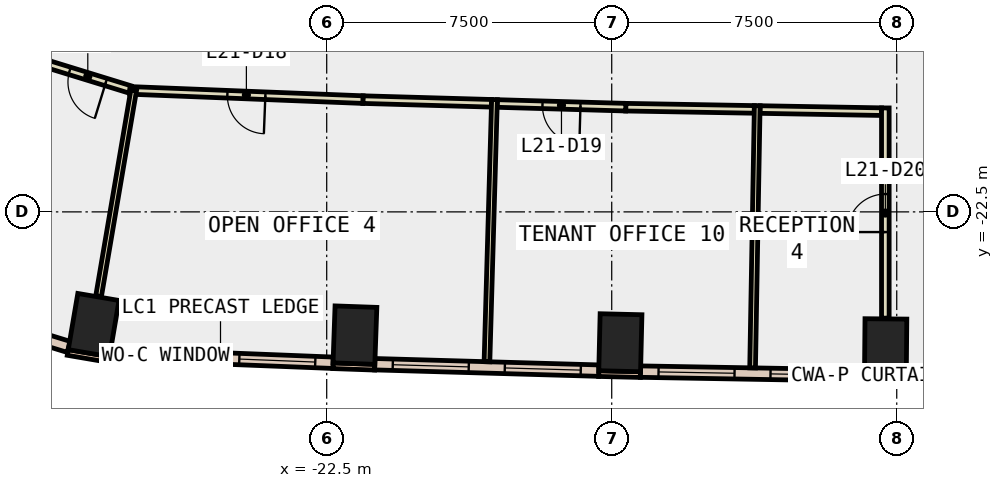
"""IFC4 building model, lengths in metres.
Left out: names, types, materials, properties, quantities, classifications, styles, units other than length and angle.
Written with IfcOpenShell. Run it as: python <this file> out.ifc"""

import sys

from ifc_helpers import new_model, si_unit, direction, frame, frame_2d, origin, origin_2d, place, context, subcontext, project, spatial, rectangle, extrude, element, fill, save


model = new_model("IFC4")
c1 = context("Model", 3, precision=1e-05, world=origin(), true_north=direction((0.0, 1.0)))
c2 = subcontext(c1, "Body", "Model", "MODEL_VIEW")
j1 = project(units=[si_unit("LENGTHUNIT", "METRE"), si_unit("PLANEANGLEUNIT", "RADIAN")], contexts=[c1])
p1 = place(None, origin())
s1 = spatial("IfcSite", under=j1, at=p1, CompositionType="ELEMENT")
p2 = place(p1, origin())
s2 = spatial("IfcBuilding", under=s1, at=p2, CompositionType="ELEMENT")
p3 = place(p2, frame((0.0, 0.0, 99.2)))
s3 = spatial("IfcBuildingStorey", under=s2, at=p3, CompositionType="ELEMENT", Elevation=99.2)
for number, where, z_axis, x_axis in (
    (1, (-28.633, -25.478, -0.4), (0.0, 0.0, 1.0), (-0.986, 0.168, 0.0)),
    (2, (-21.757, -25.743, -0.4), (0.0, 0.0, 1.0), (-0.999, 0.035, 0.0)),
    (3, (-14.773, -25.943, -0.4), (0.0, 0.0, 1.0), (-1.0, 0.024, 0.0)),
    (4, (-7.792, -26.066, -0.4), (0.0, 0.0, 1.0), (-1.0, 0.009, 0.0)),
):
    element("IfcColumn", number, at=place(p3, frame(where, z_axis=z_axis, x_axis=x_axis)), inside=s3, PredefinedType="COLUMN", context=c2, shape_type="SweptSolid", body=[
        extrude(rectangle(XDim=1.1, YDim=1.5, at=origin_2d()), origin(), (0.0, 0.0, 1.0), 4.2),
    ])
p4 = place(p3, frame((-29.314, -26.199, 0.0), z_axis=(0.0, 0.0, 1.0), x_axis=(0.985763338892, -0.168138751323, 0.0)))
e5 = element("IfcWall", 5, at=p4, inside=s3, PredefinedType="STANDARD", context=c2, shape_type="SweptSolid", body=[
    extrude(rectangle(XDim=1.101, YDim=0.15, at=frame_2d((0.55, 0.0))), origin(), (0.0, 0.0, 1.0), 3.8),
])
p5 = place(p3, frame((-22.336, -26.548, 0.0), z_axis=(0.0, 0.0, 1.0), x_axis=(0.999376638472, -0.035303462679, 0.0)))
e6 = element("IfcWall", 6, at=p5, inside=s3, PredefinedType="STANDARD", context=c2, shape_type="SweptSolid", body=[
    extrude(rectangle(XDim=1.1, YDim=0.15, at=frame_2d((0.55, 0.0))), origin(), (0.0, 0.0, 1.0), 3.8),
])
p6 = place(p3, frame((-15.343, -26.755, 0.0), z_axis=(0.0, 0.0, 1.0), x_axis=(0.999718180159, -0.023739424163, 0.0)))
e7 = element("IfcWall", 7, at=p6, inside=s3, PredefinedType="STANDARD", context=c2, shape_type="SweptSolid", body=[
    extrude(rectangle(XDim=1.1, YDim=0.15, at=frame_2d((0.55, 0.0))), origin(), (0.0, 0.0, 1.0), 3.8),
])
p7 = place(p3, frame((-8.349, -26.886, 0.0), z_axis=(0.0, 0.0, 1.0), x_axis=(0.99995860686, -0.009098602504, 0.0)))
e8 = element("IfcWall", 8, at=p7, inside=s3, PredefinedType="STANDARD", context=c2, shape_type="SweptSolid", body=[
    extrude(rectangle(XDim=1.1, YDim=0.15, at=frame_2d((0.55, 0.0))), origin(), (0.0, 0.0, 1.0), 3.8),
])
p8 = place(p3, frame((-28.205, -26.238, 0.0), z_axis=(0.0, 0.0, 1.0), x_axis=(0.99922113396, -0.039460428885, 0.0)))
e9 = element("IfcWall", 9, at=p8, inside=s3, PredefinedType="STANDARD", context=c2, shape_type="SweptSolid", body=[
    extrude(rectangle(XDim=5.878, YDim=0.3, at=frame_2d((2.939, 0.0))), origin(), (0.0, 0.0, 1.0), 3.8),
])
p9 = place(p8, frame((0.469, 0.0, 0.9)))
e10 = element("IfcOpeningElement", 10, at=p9, cuts=e9, PredefinedType="OPENING", context=c2, shape_type="SweptSolid", body=[
    extrude(rectangle(XDim=2.0, YDim=2.6, at=frame_2d((1.0, 1.3))), frame((0.0, 0.16, 0.0), z_axis=(0.0, -1.0, 0.0), x_axis=(1.0, 0.0, 0.0)), (0.0, 0.0, 1.0), 0.32),
])
p10 = place(p8, frame((3.408, 0.0, 0.9)))
e11 = element("IfcOpeningElement", 11, at=p10, cuts=e9, PredefinedType="OPENING", context=c2, shape_type="SweptSolid", body=[
    extrude(rectangle(XDim=2.0, YDim=2.6, at=frame_2d((1.0, 1.3))), frame((0.0, 0.16, 0.0), z_axis=(0.0, -1.0, 0.0), x_axis=(1.0, 0.0, 0.0)), (0.0, 0.0, 1.0), 0.32),
])
p11 = place(p3, frame((-21.235, -26.508, 0.0), z_axis=(0.0, 0.0, 1.0), x_axis=(0.999589583914, -0.028647229026, 0.0)))
e12 = element("IfcWall", 12, at=p11, inside=s3, PredefinedType="STANDARD", context=c2, shape_type="SweptSolid", body=[
    extrude(rectangle(XDim=5.897, YDim=0.3, at=frame_2d((2.949, 0.0))), origin(), (0.0, 0.0, 1.0), 3.8),
])
p12 = place(p11, frame((0.474, 0.0, 0.9)))
e13 = element("IfcOpeningElement", 13, at=p12, cuts=e12, PredefinedType="OPENING", context=c2, shape_type="SweptSolid", body=[
    extrude(rectangle(XDim=2.0, YDim=2.6, at=frame_2d((1.0, 1.3))), frame((0.0, 0.16, 0.0), z_axis=(0.0, -1.0, 0.0), x_axis=(1.0, 0.0, 0.0)), (0.0, 0.0, 1.0), 0.32),
])
p13 = place(p11, frame((3.423, 0.0, 0.9)))
e14 = element("IfcOpeningElement", 14, at=p13, cuts=e12, PredefinedType="OPENING", context=c2, shape_type="SweptSolid", body=[
    extrude(rectangle(XDim=2.0, YDim=2.6, at=frame_2d((1.0, 1.3))), frame((0.0, 0.16, 0.0), z_axis=(0.0, -1.0, 0.0), x_axis=(1.0, 0.0, 0.0)), (0.0, 0.0, 1.0), 0.32),
])
p14 = place(p3, frame((-14.242, -26.703, 0.0), z_axis=(0.0, 0.0, 1.0), x_axis=(0.999847261365, -0.017477240672, 0.0)))
e15 = element("IfcWall", 15, at=p14, inside=s3, PredefinedType="STANDARD", context=c2, shape_type="SweptSolid", body=[
    extrude(rectangle(XDim=5.895, YDim=0.3, at=frame_2d((2.948, 0.0))), origin(), (0.0, 0.0, 1.0), 3.8),
])
p15 = place(p14, frame((0.474, 0.0, 0.9)))
e16 = element("IfcOpeningElement", 16, at=p15, cuts=e15, PredefinedType="OPENING", context=c2, shape_type="SweptSolid", body=[
    extrude(rectangle(XDim=2.0, YDim=2.6, at=frame_2d((1.0, 1.3))), frame((0.0, 0.16, 0.0), z_axis=(0.0, -1.0, 0.0), x_axis=(1.0, 0.0, 0.0)), (0.0, 0.0, 1.0), 0.32),
])
p16 = place(p14, frame((3.421, 0.0, 0.9)))
e17 = element("IfcOpeningElement", 17, at=p16, cuts=e15, PredefinedType="OPENING", context=c2, shape_type="SweptSolid", body=[
    extrude(rectangle(XDim=2.0, YDim=2.6, at=frame_2d((1.0, 1.3))), frame((0.0, 0.16, 0.0), z_axis=(0.0, -1.0, 0.0), x_axis=(1.0, 0.0, 0.0)), (0.0, 0.0, 1.0), 0.32),
])
p17 = place(p3, frame((-32.924, -24.935, 0.0), z_axis=(0.0, 0.0, 1.0), x_axis=(0.955841433148, -0.293882892794, 0.0)))
e18 = element("IfcWall", 18, at=p17, inside=s3, PredefinedType="STANDARD", context=c2, shape_type="SweptSolid", body=[
    extrude(rectangle(XDim=3.804, YDim=0.3, at=frame_2d((1.902, 0.0))), origin(), (0.0, 0.0, 1.0), 3.8),
])
p18 = place(p17, frame((1.202, 0.0, 0.9)))
e19 = element("IfcOpeningElement", 19, at=p18, cuts=e18, PredefinedType="OPENING", context=c2, shape_type="SweptSolid", body=[
    extrude(rectangle(XDim=1.4, YDim=2.6, at=frame_2d((0.7, 1.3))), frame((0.0, 0.16, 0.0), z_axis=(0.0, -1.0, 0.0), x_axis=(1.0, 0.0, 0.0)), (0.0, 0.0, 1.0), 0.32),
])
p19 = place(p3, frame((-27.676, -19.278, 0.0), z_axis=(0.0, 0.0, 1.0), x_axis=(-0.95581080774, 0.293982482143, 0.0)))
e20 = element("IfcWall", 20, at=p19, inside=s3, PredefinedType="PARTITIONING", context=c2, shape_type="SweptSolid", body=[
    extrude(rectangle(XDim=2.324, YDim=0.2, at=frame_2d((1.162, 0.0))), origin(), (0.0, 0.0, 1.0), 3.8),
])
p20 = place(p19, frame((0.662, 0.0, 0.0)))
e21 = element("IfcOpeningElement", 21, at=p20, cuts=e20, PredefinedType="OPENING", context=c2, shape_type="SweptSolid", body=[
    extrude(rectangle(XDim=1.0, YDim=2.1, at=frame_2d((0.5, 1.05))), frame((0.0, 0.11, 0.0), z_axis=(0.0, -1.0, 0.0), x_axis=(1.0, 0.0, 0.0)), (0.0, 0.0, 1.0), 0.22),
])
p21 = place(p3, frame((-18.163, -19.643, 0.0), z_axis=(0.0, 0.0, 1.0), x_axis=(-0.999588017684, 0.028701827504, 0.0)))
e22 = element("IfcWall", 22, at=p21, inside=s3, PredefinedType="PARTITIONING", context=c2, shape_type="SweptSolid", body=[
    extrude(rectangle(XDim=3.385, YDim=0.2, at=frame_2d((1.693, 0.0))), origin(), (0.0, 0.0, 1.0), 3.8),
])
p22 = place(p3, frame((-21.547, -19.546, 0.0), z_axis=(0.0, 0.0, 1.0), x_axis=(-0.999216450883, 0.039578836331, 0.0)))
e23 = element("IfcWall", 23, at=p22, inside=s3, PredefinedType="PARTITIONING", context=c2, shape_type="SweptSolid", body=[
    extrude(rectangle(XDim=6.138, YDim=0.2, at=frame_2d((3.069, 0.0))), origin(), (0.0, 0.0, 1.0), 3.8),
])
p23 = place(p22, frame((2.569, 0.0, 0.0)))
e24 = element("IfcOpeningElement", 24, at=p23, cuts=e23, PredefinedType="OPENING", context=c2, shape_type="SweptSolid", body=[
    extrude(rectangle(XDim=1.0, YDim=2.1, at=frame_2d((0.5, 1.05))), frame((0.0, 0.11, 0.0), z_axis=(0.0, -1.0, 0.0), x_axis=(1.0, 0.0, 0.0)), (0.0, 0.0, 1.0), 0.22),
])
p24 = place(p3, frame((-11.248, -19.804, 0.0), z_axis=(0.0, 0.0, 1.0), x_axis=(-0.999848794654, 0.017389302123, 0.0)))
e25 = element("IfcWall", 25, at=p24, inside=s3, PredefinedType="PARTITIONING", context=c2, shape_type="SweptSolid", body=[
    extrude(rectangle(XDim=3.384, YDim=0.2, at=frame_2d((1.692, 0.0))), origin(), (0.0, 0.0, 1.0), 3.8),
])
p25 = place(p3, frame((-14.631, -19.745, 0.0), z_axis=(0.0, 0.0, 1.0), x_axis=(-0.999587482491, 0.028720460441, 0.0)))
e26 = element("IfcWall", 26, at=p25, inside=s3, PredefinedType="PARTITIONING", context=c2, shape_type="SweptSolid", body=[
    extrude(rectangle(XDim=3.383, YDim=0.2, at=frame_2d((1.692, 0.0))), origin(), (0.0, 0.0, 1.0), 3.8),
])
p26 = place(p25, frame((1.192, 0.0, 0.0)))
e27 = element("IfcOpeningElement", 27, at=p26, cuts=e26, PredefinedType="OPENING", context=c2, shape_type="SweptSolid", body=[
    extrude(rectangle(XDim=1.0, YDim=2.1, at=frame_2d((0.5, 1.05))), frame((0.0, 0.11, 0.0), z_axis=(0.0, -1.0, 0.0), x_axis=(1.0, 0.0, 0.0)), (0.0, 0.0, 1.0), 0.22),
])
p27 = place(p3, frame((-7.9, -19.863, 0.0), z_axis=(0.0, 0.0, 1.0), x_axis=(-0.999845883554, 0.017555886191, 0.0)))
e28 = element("IfcWall", 28, at=p27, inside=s3, PredefinedType="PARTITIONING", context=c2, shape_type="SweptSolid", body=[
    extrude(rectangle(XDim=3.198, YDim=0.2, at=frame_2d((1.599, 0.0))), origin(), (0.0, 0.0, 1.0), 3.8),
])
p28 = place(p3, frame((-7.8, -25.296, 0.0), z_axis=(0.0, 0.0, 1.0), x_axis=(0.0, 1.0, 0.0)))
e29 = element("IfcWall", 29, at=p28, inside=s3, PredefinedType="PARTITIONING", context=c2, shape_type="SweptSolid", body=[
    extrude(rectangle(XDim=5.531, YDim=0.2, at=frame_2d((2.766, 0.0))), origin(), (0.0, 0.0, 1.0), 3.8),
])
p29 = place(p28, frame((2.265, 0.0, 0.0)))
e30 = element("IfcOpeningElement", 30, at=p29, cuts=e29, PredefinedType="OPENING", context=c2, shape_type="SweptSolid", body=[
    extrude(rectangle(XDim=1.0, YDim=2.1, at=frame_2d((0.5, 1.05))), frame((0.0, 0.11, 0.0), z_axis=(0.0, -1.0, 0.0), x_axis=(1.0, 0.0, 0.0)), (0.0, 0.0, 1.0), 0.22),
])
p30 = place(p3, frame((-27.58, -19.307, 0.0), z_axis=(0.0, 0.0, 1.0), x_axis=(-0.168089900424, -0.98577167, 0.0)))
e31 = element("IfcWall", 31, at=p30, inside=s3, PredefinedType="PARTITIONING", context=c2, shape_type="SweptSolid", body=[
    extrude(rectangle(XDim=5.49, YDim=0.15, at=frame_2d((2.745, 0.0))), origin(), (0.0, 0.0, 1.0), 3.8),
])
p31 = place(p3, frame((-18.085, -19.545, 0.0), z_axis=(0.0, 0.0, 1.0), x_axis=(-0.02869106823, -0.999588326564, 0.0)))
e32 = element("IfcWall", 32, at=p31, inside=s3, PredefinedType="PARTITIONING", context=c2, shape_type="SweptSolid", body=[
    extrude(rectangle(XDim=6.901, YDim=0.15, at=frame_2d((3.451, 0.0))), origin(), (0.0, 0.0, 1.0), 3.8),
])
p32 = place(p3, frame((-11.171, -19.706, 0.0), z_axis=(0.0, 0.0, 1.0), x_axis=(-0.017691335128, -0.999843496084, 0.0)))
e33 = element("IfcWall", 33, at=p32, inside=s3, PredefinedType="PARTITIONING", context=c2, shape_type="SweptSolid", body=[
    extrude(rectangle(XDim=6.9, YDim=0.15, at=frame_2d((3.45, 0.0))), origin(), (0.0, 0.0, 1.0), 3.8),
])
p33 = place(p9, origin())
e34 = element("IfcWindow", 34, at=p33, inside=s3, PartitioningType="SINGLE_PANEL", PredefinedType="WINDOW", context=c2, shape_type="SweptSolid", body=[
    extrude(rectangle(XDim=2.0, YDim=2.6, at=frame_2d((1.0, 1.3))), frame((0.0, 0.03, 0.0), z_axis=(0.0, -1.0, 0.0), x_axis=(1.0, 0.0, 0.0)), (0.0, 0.0, 1.0), 0.06),
])
fill(e10, e34)
p34 = place(p10, origin())
e35 = element("IfcWindow", 35, at=p34, inside=s3, PartitioningType="SINGLE_PANEL", PredefinedType="WINDOW", context=c2, shape_type="SweptSolid", body=[
    extrude(rectangle(XDim=2.0, YDim=2.6, at=frame_2d((1.0, 1.3))), frame((0.0, 0.03, 0.0), z_axis=(0.0, -1.0, 0.0), x_axis=(1.0, 0.0, 0.0)), (0.0, 0.0, 1.0), 0.06),
])
fill(e11, e35)
p35 = place(p12, origin())
e36 = element("IfcWindow", 36, at=p35, inside=s3, PartitioningType="SINGLE_PANEL", PredefinedType="WINDOW", context=c2, shape_type="SweptSolid", body=[
    extrude(rectangle(XDim=2.0, YDim=2.6, at=frame_2d((1.0, 1.3))), frame((0.0, 0.03, 0.0), z_axis=(0.0, -1.0, 0.0), x_axis=(1.0, 0.0, 0.0)), (0.0, 0.0, 1.0), 0.06),
])
fill(e13, e36)
p36 = place(p13, origin())
e37 = element("IfcWindow", 37, at=p36, inside=s3, PartitioningType="SINGLE_PANEL", PredefinedType="WINDOW", context=c2, shape_type="SweptSolid", body=[
    extrude(rectangle(XDim=2.0, YDim=2.6, at=frame_2d((1.0, 1.3))), frame((0.0, 0.03, 0.0), z_axis=(0.0, -1.0, 0.0), x_axis=(1.0, 0.0, 0.0)), (0.0, 0.0, 1.0), 0.06),
])
fill(e14, e37)
p37 = place(p15, origin())
e38 = element("IfcWindow", 38, at=p37, inside=s3, PartitioningType="SINGLE_PANEL", PredefinedType="WINDOW", context=c2, shape_type="SweptSolid", body=[
    extrude(rectangle(XDim=2.0, YDim=2.6, at=frame_2d((1.0, 1.3))), frame((0.0, 0.03, 0.0), z_axis=(0.0, -1.0, 0.0), x_axis=(1.0, 0.0, 0.0)), (0.0, 0.0, 1.0), 0.06),
])
fill(e16, e38)
p38 = place(p16, origin())
e39 = element("IfcWindow", 39, at=p38, inside=s3, PartitioningType="SINGLE_PANEL", PredefinedType="WINDOW", context=c2, shape_type="SweptSolid", body=[
    extrude(rectangle(XDim=2.0, YDim=2.6, at=frame_2d((1.0, 1.3))), frame((0.0, 0.03, 0.0), z_axis=(0.0, -1.0, 0.0), x_axis=(1.0, 0.0, 0.0)), (0.0, 0.0, 1.0), 0.06),
])
fill(e17, e39)
p39 = place(p20, origin())
e40 = element("IfcDoor", 40, at=p39, inside=s3, OperationType="SINGLE_SWING_LEFT", PredefinedType="DOOR", context=c2, shape_type="SweptSolid", body=[
    extrude(rectangle(XDim=1.0, YDim=2.1, at=frame_2d((0.5, 1.05))), frame((0.0, 0.025, 0.0), z_axis=(0.0, -1.0, 0.0), x_axis=(1.0, 0.0, 0.0)), (0.0, 0.0, 1.0), 0.05),
])
fill(e21, e40)
p40 = place(p23, origin())
e41 = element("IfcDoor", 41, at=p40, inside=s3, OperationType="SINGLE_SWING_LEFT", PredefinedType="DOOR", context=c2, shape_type="SweptSolid", body=[
    extrude(rectangle(XDim=1.0, YDim=2.1, at=frame_2d((0.5, 1.05))), frame((0.0, 0.025, 0.0), z_axis=(0.0, -1.0, 0.0), x_axis=(1.0, 0.0, 0.0)), (0.0, 0.0, 1.0), 0.05),
])
fill(e24, e41)
p41 = place(p26, origin())
e42 = element("IfcDoor", 42, at=p41, inside=s3, OperationType="SINGLE_SWING_RIGHT", PredefinedType="DOOR", context=c2, shape_type="SweptSolid", body=[
    extrude(rectangle(XDim=1.0, YDim=2.1, at=frame_2d((0.5, 1.05))), frame((0.0, 0.025, 0.0), z_axis=(0.0, -1.0, 0.0), x_axis=(1.0, 0.0, 0.0)), (0.0, 0.0, 1.0), 0.05),
])
fill(e27, e42)
p42 = place(p29, origin())
e43 = element("IfcDoor", 43, at=p42, inside=s3, OperationType="SINGLE_SWING_LEFT", PredefinedType="DOOR", context=c2, shape_type="SweptSolid", body=[
    extrude(rectangle(XDim=1.0, YDim=2.1, at=frame_2d((0.5, 1.05))), frame((0.0, 0.025, 0.0), z_axis=(0.0, -1.0, 0.0), x_axis=(1.0, 0.0, 0.0)), (0.0, 0.0, 1.0), 0.05),
])
fill(e30, e43)
save(model, sys.argv[1])
